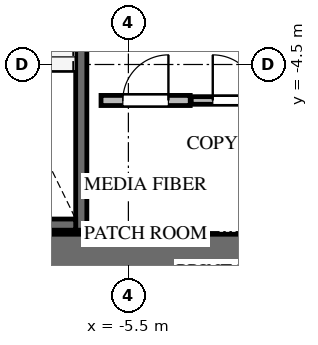
"""IFC4 building model, lengths in metres.
Left out: names, types, materials, properties, quantities, classifications, styles, units other than length and angle.
Written with IfcOpenShell. Run it as: python <this file> out.ifc"""

import sys

from ifc_helpers import new_model, si_unit, direction, frame, frame_2d, origin, place, context, subcontext, project, spatial, rectangle, extrude, source, transform, mapped, element, fill, save


model = new_model("IFC4")
c1 = context("Model", 3, precision=1e-05, world=origin(), true_north=direction((0.0, 1.0)))
c2 = subcontext(c1, "Body", "Model", "MODEL_VIEW")
j1 = project(units=[si_unit("LENGTHUNIT", "METRE"), si_unit("PLANEANGLEUNIT", "RADIAN")], contexts=[c1])
p1 = place(None, origin())
s1 = spatial("IfcSite", under=j1, at=p1, CompositionType="ELEMENT")
p2 = place(p1, origin())
s2 = spatial("IfcBuilding", under=s1, at=p2, CompositionType="ELEMENT")
p3 = place(p2, frame((0.0, 0.0, 146.1)))
s3 = spatial("IfcBuildingStorey", under=s2, at=p3, CompositionType="ELEMENT", Elevation=146.1)
p4 = place(p3, frame((-9.85, -8.225, 0.0), z_axis=(0.0, 0.0, 1.0), x_axis=(1.0, 0.0, 0.0)))
e1 = element("IfcWall", 1, at=p4, inside=s3, PredefinedType="SHEAR", context=c2, shape_type="SweptSolid", body=[
    extrude(rectangle(XDim=7.75, YDim=0.75, at=frame_2d((3.875, 0.0))), origin(), (0.0, 0.0, 1.0), 4.2),
])
p5 = place(p3, frame((-6.43, -7.77, -0.24), z_axis=(0.0, 0.0, 1.0), x_axis=(0.0, 1.0, 0.0)))
e2 = element("IfcWall", 2, at=p5, inside=s3, PredefinedType="SHEAR", context=c2, shape_type="SweptSolid", body=[
    extrude(rectangle(XDim=7.89, YDim=0.22, at=frame_2d((3.945, 0.0))), origin(), (0.0, 0.0, 1.0), 4.12),
])
p6 = place(p5, frame((6.32, 0.0, 0.0)))
e3 = element("IfcOpeningElement", 3, at=p6, cuts=e2, PredefinedType="OPENING", context=c2, shape_type="SweptSolid", body=[
    extrude(rectangle(XDim=1.05, YDim=2.15, at=frame_2d((0.525, 1.075))), frame((0.0, 0.12, 0.0), z_axis=(0.0, -1.0, 0.0), x_axis=(1.0, 0.0, 0.0)), (0.0, 0.0, 1.0), 0.24),
])
p7 = place(p3, frame((-9.5, -7.66, -0.24), z_axis=(0.0, 0.0, 1.0), x_axis=(1.0, 0.0, 0.0)))
e4 = element("IfcWall", 4, at=p7, inside=s3, PredefinedType="SHEAR", context=c2, shape_type="SweptSolid", body=[
    extrude(rectangle(XDim=2.96, YDim=0.22, at=frame_2d((1.48, 0.0))), origin(), (0.0, 0.0, 1.0), 4.12),
])
p8 = place(p3, frame((-6.04, -5.21, 0.0), z_axis=(0.0, 0.0, 1.0), x_axis=(1.0, 0.0, 0.0)))
e5 = element("IfcWall", 5, at=p8, inside=s3, PredefinedType="SOLIDWALL", context=c2, shape_type="SweptSolid", body=[
    extrude(rectangle(XDim=1.76, YDim=0.2, at=frame_2d((0.88, 0.0))), origin(), (0.0, 0.0, 1.0), 3.865),
])
p9 = place(p8, frame((0.43, 0.0, 0.0)))
e6 = element("IfcOpeningElement", 6, at=p9, cuts=e5, PredefinedType="OPENING", context=c2, shape_type="SweptSolid", body=[
    extrude(rectangle(XDim=0.9, YDim=2.05, at=frame_2d((0.45, 1.025))), frame((0.0, 0.11, 0.0), z_axis=(0.0, -1.0, 0.0), x_axis=(1.0, 0.0, 0.0)), (0.0, 0.0, 1.0), 0.22),
])
p10 = place(p3, frame((-4.26, -5.21, 0.0), z_axis=(0.0, 0.0, 1.0), x_axis=(1.0, 0.0, 0.0)))
e7 = element("IfcWall", 7, at=p10, inside=s3, PredefinedType="PARTITIONING", context=c2, shape_type="SweptSolid", body=[
    extrude(rectangle(XDim=1.75, YDim=0.15, at=frame_2d((0.875, 0.0))), origin(), (0.0, 0.0, 1.0), 3.865),
])
p11 = place(p10, frame((0.425, 0.0, 0.0)))
e8 = element("IfcOpeningElement", 8, at=p11, cuts=e7, PredefinedType="OPENING", context=c2, shape_type="SweptSolid", body=[
    extrude(rectangle(XDim=0.9, YDim=2.05, at=frame_2d((0.45, 1.025))), frame((0.0, 0.085, 0.0), z_axis=(0.0, -1.0, 0.0), x_axis=(1.0, 0.0, 0.0)), (0.0, 0.0, 1.0), 0.17),
])
m1 = source(origin(), c2, "Body", "SweptSolid", [
    extrude(rectangle(XDim=0.9, YDim=2.05, at=frame_2d((0.45, 1.025))), frame((0.0, 0.025, 0.0), z_axis=(0.0, -1.0, 0.0), x_axis=(1.0, 0.0, 0.0)), (0.0, 0.0, 1.0), 0.05),
])
p12 = place(p9, origin())
e9 = element("IfcDoor", 9, at=p12, inside=s3, OperationType="SINGLE_SWING_RIGHT", PredefinedType="DOOR", context=c2, shape_type="MappedRepresentation", body=[
    mapped(m1, transform((0.0, 0.0, 0.0), x_axis=(1.0, 0.0, 0.0), y_axis=(0.0, 1.0, 0.0), z_axis=(0.0, 0.0, 1.0), scale=1.0)),
])
fill(e6, e9)
m2 = source(origin(), c2, "Body", "SweptSolid", [
    extrude(rectangle(XDim=0.9, YDim=2.05, at=frame_2d((0.45, 1.025))), frame((0.0, 0.025, 0.0), z_axis=(0.0, -1.0, 0.0), x_axis=(1.0, 0.0, 0.0)), (0.0, 0.0, 1.0), 0.05),
])
p13 = place(p11, origin())
e10 = element("IfcDoor", 10, at=p13, inside=s3, OperationType="SINGLE_SWING_LEFT", PredefinedType="DOOR", context=c2, shape_type="MappedRepresentation", body=[
    mapped(m2, transform((0.0, 0.0, 0.0), x_axis=(1.0, 0.0, 0.0), y_axis=(0.0, 1.0, 0.0), z_axis=(0.0, 0.0, 1.0), scale=1.0)),
])
fill(e8, e10)
save(model, sys.argv[1])
